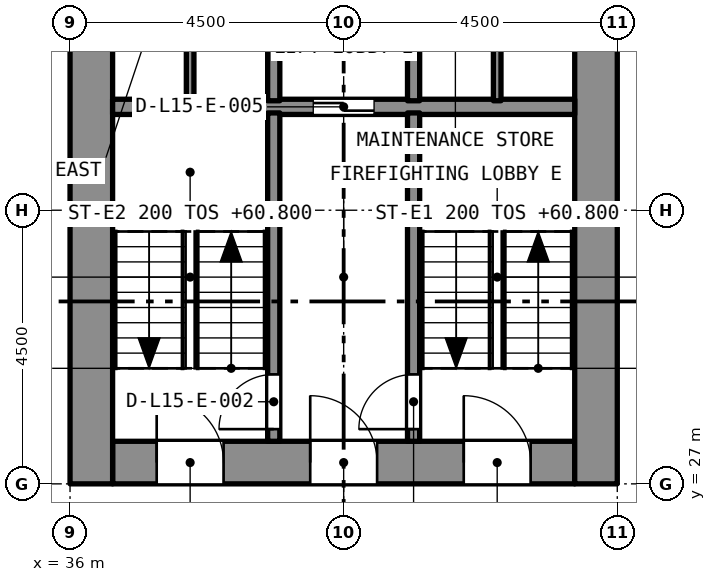
"""IFC4 building model, lengths in metres.
Left out: names, types, materials, properties, quantities, classifications, styles, units other than length and angle.
Written with IfcOpenShell. Run it as: python <this file> out.ifc"""

import sys

from ifc_helpers import new_model, si_unit, direction, frame, frame_2d, origin, place, context, subcontext, project, spatial, rectangle, extrude, element, fill, save


model = new_model("IFC4")
c1 = context("Model", 3, precision=1e-05, world=origin(), true_north=direction((0.0, 1.0)))
c2 = subcontext(c1, "Body", "Model", "MODEL_VIEW")
j1 = project(units=[si_unit("LENGTHUNIT", "METRE"), si_unit("PLANEANGLEUNIT", "RADIAN")], contexts=[c1])
p1 = place(None, origin())
s1 = spatial("IfcSite", under=j1, at=p1, CompositionType="ELEMENT")
p2 = place(p1, origin())
s2 = spatial("IfcBuilding", under=s1, at=p2, CompositionType="ELEMENT")
p3 = place(p2, frame((0.0, 0.0, 59.2)))
s3 = spatial("IfcBuildingStorey", under=s2, at=p3, CompositionType="ELEMENT", Elevation=59.2)
p4 = place(p3, frame((36.7, 27.35, 0.0), z_axis=(0.0, 0.0, 1.0), x_axis=(1.0, 0.0, 0.0)))
e1 = element("IfcWall", 1, at=p4, inside=s3, PredefinedType="SOLIDWALL", context=c2, shape_type="SweptSolid", body=[
    extrude(rectangle(XDim=7.6, YDim=0.7, at=frame_2d((3.8, 0.0))), origin(), (0.0, 0.0, 1.0), 3.2),
])
p5 = place(p4, frame((5.775, 0.0, 0.0)))
e2 = element("IfcOpeningElement", 2, at=p5, cuts=e1, PredefinedType="OPENING", context=c2, shape_type="SweptSolid", body=[
    extrude(rectangle(XDim=1.1, YDim=2.1, at=frame_2d((0.55, 1.05))), frame((0.0, 0.36, 0.0), z_axis=(0.0, -1.0, 0.0), x_axis=(1.0, 0.0, 0.0)), (0.0, 0.0, 1.0), 0.72),
])
p6 = place(p4, frame((3.25, 0.0, 0.0)))
e3 = element("IfcOpeningElement", 3, at=p6, cuts=e1, PredefinedType="OPENING", context=c2, shape_type="SweptSolid", body=[
    extrude(rectangle(XDim=1.1, YDim=2.1, at=frame_2d((0.55, 1.05))), frame((0.0, 0.36, 0.0), z_axis=(0.0, -1.0, 0.0), x_axis=(1.0, 0.0, 0.0)), (0.0, 0.0, 1.0), 0.72),
])
p7 = place(p4, frame((0.725, 0.0, 0.0)))
e4 = element("IfcOpeningElement", 4, at=p7, cuts=e1, PredefinedType="OPENING", context=c2, shape_type="SweptSolid", body=[
    extrude(rectangle(XDim=1.1, YDim=2.1, at=frame_2d((0.55, 1.05))), frame((0.0, 0.36, 0.0), z_axis=(0.0, -1.0, 0.0), x_axis=(1.0, 0.0, 0.0)), (0.0, 0.0, 1.0), 0.72),
])
p8 = place(p3, frame((36.35, 27.0, 0.0), z_axis=(0.0, 0.0, 1.0), x_axis=(0.0, 1.0, 0.0)))
e5 = element("IfcWall", 5, at=p8, inside=s3, PredefinedType="SOLIDWALL", context=c2, shape_type="SweptSolid", body=[
    extrude(rectangle(XDim=13.5, YDim=0.7, at=frame_2d((6.75, 0.0))), origin(), (0.0, 0.0, 1.0), 3.2),
])
p9 = place(p8, frame((8.95, 0.0, 0.0)))
e6 = element("IfcOpeningElement", 6, at=p9, cuts=e5, PredefinedType="OPENING", context=c2, shape_type="SweptSolid", body=[
    extrude(rectangle(XDim=1.2, YDim=2.1, at=frame_2d((0.6, 1.05))), frame((0.0, 0.36, 0.0), z_axis=(0.0, -1.0, 0.0), x_axis=(1.0, 0.0, 0.0)), (0.0, 0.0, 1.0), 0.72),
])
p10 = place(p3, frame((44.65, 27.0, 0.0), z_axis=(0.0, 0.0, 1.0), x_axis=(0.0, 1.0, 0.0)))
e7 = element("IfcWall", 7, at=p10, inside=s3, PredefinedType="SOLIDWALL", context=c2, shape_type="SweptSolid", body=[
    extrude(rectangle(XDim=13.5, YDim=0.7, at=frame_2d((6.75, 0.0))), origin(), (0.0, 0.0, 1.0), 3.2),
])
p11 = place(p10, frame((8.95, 0.0, 0.0)))
e8 = element("IfcOpeningElement", 8, at=p11, cuts=e7, PredefinedType="OPENING", context=c2, shape_type="SweptSolid", body=[
    extrude(rectangle(XDim=1.2, YDim=2.1, at=frame_2d((0.6, 1.05))), frame((0.0, 0.36, 0.0), z_axis=(0.0, -1.0, 0.0), x_axis=(1.0, 0.0, 0.0)), (0.0, 0.0, 1.0), 0.72),
])
p12 = place(p3, frame((36.7, 33.2, 0.0), z_axis=(0.0, 0.0, 1.0), x_axis=(1.0, 0.0, 0.0)))
e9 = element("IfcWall", 9, at=p12, inside=s3, PredefinedType="SOLIDWALL", context=c2, shape_type="SweptSolid", body=[
    extrude(rectangle(XDim=7.6, YDim=0.25, at=frame_2d((3.8, 0.0))), origin(), (0.0, 0.0, 1.0), 2.9),
])
p13 = place(p12, frame((3.3, 0.0, 0.0)))
e10 = element("IfcOpeningElement", 10, at=p13, cuts=e9, PredefinedType="OPENING", context=c2, shape_type="SweptSolid", body=[
    extrude(rectangle(XDim=1.0, YDim=2.1, at=frame_2d((0.5, 1.05))), frame((0.0, 0.135, 0.0), z_axis=(0.0, -1.0, 0.0), x_axis=(1.0, 0.0, 0.0)), (0.0, 0.0, 1.0), 0.27),
])
p14 = place(p3, frame((41.65, 27.7, 0.0), z_axis=(0.0, 0.0, 1.0), x_axis=(0.0, 1.0, 0.0)))
e11 = element("IfcWall", 11, at=p14, inside=s3, PredefinedType="SOLIDWALL", context=c2, shape_type="SweptSolid", body=[
    extrude(rectangle(XDim=5.4, YDim=0.2, at=frame_2d((2.7, 0.0))), origin(), (0.0, 0.0, 1.0), 2.9),
])
p15 = place(p14, frame((0.2, 0.0, 0.0)))
e12 = element("IfcOpeningElement", 12, at=p15, cuts=e11, PredefinedType="OPENING", context=c2, shape_type="SweptSolid", body=[
    extrude(rectangle(XDim=0.9, YDim=2.1, at=frame_2d((0.45, 1.05))), frame((0.0, 0.11, 0.0), z_axis=(0.0, -1.0, 0.0), x_axis=(1.0, 0.0, 0.0)), (0.0, 0.0, 1.0), 0.22),
])
p16 = place(p3, frame((39.35, 27.7, 0.0), z_axis=(0.0, 0.0, 1.0), x_axis=(0.0, 1.0, 0.0)))
e13 = element("IfcWall", 13, at=p16, inside=s3, PredefinedType="SOLIDWALL", context=c2, shape_type="SweptSolid", body=[
    extrude(rectangle(XDim=5.4, YDim=0.2, at=frame_2d((2.7, 0.0))), origin(), (0.0, 0.0, 1.0), 2.9),
])
p17 = place(p16, frame((0.2, 0.0, 0.0)))
e14 = element("IfcOpeningElement", 14, at=p17, cuts=e13, PredefinedType="OPENING", context=c2, shape_type="SweptSolid", body=[
    extrude(rectangle(XDim=0.9, YDim=2.1, at=frame_2d((0.45, 1.05))), frame((0.0, 0.11, 0.0), z_axis=(0.0, -1.0, 0.0), x_axis=(1.0, 0.0, 0.0)), (0.0, 0.0, 1.0), 0.22),
])
for number, where, z_axis, x_axis in (
    (15, (41.65, 33.3, 0.0), (0.0, 0.0, 1.0), (0.0, 1.0, 0.0)),
    (16, (39.35, 33.3, 0.0), (0.0, 0.0, 1.0), (0.0, 1.0, 0.0)),
):
    element("IfcWall", number, at=place(p3, frame(where, z_axis=z_axis, x_axis=x_axis)), inside=s3, PredefinedType="SOLIDWALL", context=c2, shape_type="SweptSolid", body=[
        extrude(rectangle(XDim=2.3, YDim=0.2, at=frame_2d((1.15, 0.0))), origin(), (0.0, 0.0, 1.0), 2.9),
    ])
for number, where, z_axis, x_axis in (
    (17, (43.025, 33.3, 0.0), (0.0, 0.0, 1.0), (0.0, 1.0, 0.0)),
    (18, (37.975, 33.3, 0.0), (0.0, 0.0, 1.0), (0.0, 1.0, 0.0)),
):
    element("IfcWall", number, at=place(p3, frame(where, z_axis=z_axis, x_axis=x_axis)), inside=s3, PredefinedType="PARTITIONING", context=c2, shape_type="SweptSolid", body=[
        extrude(rectangle(XDim=2.3, YDim=0.125, at=frame_2d((1.15, 0.0))), origin(), (0.0, 0.0, 1.0), 2.9),
    ])
p18 = place(p15, origin())
e19 = element("IfcDoor", 19, at=p18, inside=s3, OperationType="SINGLE_SWING_LEFT", PredefinedType="DOOR", context=c2, shape_type="SweptSolid", body=[
    extrude(rectangle(XDim=0.9, YDim=2.1, at=frame_2d((0.45, 1.05))), frame((0.0, 0.025, 0.0), z_axis=(0.0, -1.0, 0.0), x_axis=(1.0, 0.0, 0.0)), (0.0, 0.0, 1.0), 0.05),
])
fill(e12, e19)
p19 = place(p17, origin())
e20 = element("IfcDoor", 20, at=p19, inside=s3, OperationType="SINGLE_SWING_LEFT", PredefinedType="DOOR", context=c2, shape_type="SweptSolid", body=[
    extrude(rectangle(XDim=0.9, YDim=2.1, at=frame_2d((0.45, 1.05))), frame((0.0, 0.025, 0.0), z_axis=(0.0, -1.0, 0.0), x_axis=(1.0, 0.0, 0.0)), (0.0, 0.0, 1.0), 0.05),
])
fill(e14, e20)
p20 = place(p13, origin())
e21 = element("IfcDoor", 21, at=p20, inside=s3, OperationType="SLIDING_TO_LEFT", PredefinedType="DOOR", context=c2, shape_type="SweptSolid", body=[
    extrude(rectangle(XDim=1.0, YDim=2.1, at=frame_2d((0.5, 1.05))), frame((0.0, 0.025, 0.0), z_axis=(0.0, -1.0, 0.0), x_axis=(1.0, 0.0, 0.0)), (0.0, 0.0, 1.0), 0.05),
])
fill(e10, e21)
p21 = place(p5, origin())
e22 = element("IfcDoor", 22, at=p21, inside=s3, OperationType="SINGLE_SWING_LEFT", PredefinedType="DOOR", context=c2, shape_type="SweptSolid", body=[
    extrude(rectangle(XDim=1.1, YDim=2.1, at=frame_2d((0.55, 1.05))), frame((0.0, 0.025, 0.0), z_axis=(0.0, -1.0, 0.0), x_axis=(1.0, 0.0, 0.0)), (0.0, 0.0, 1.0), 0.05),
])
fill(e2, e22)
p22 = place(p6, origin())
e23 = element("IfcDoor", 23, at=p22, inside=s3, OperationType="SINGLE_SWING_LEFT", PredefinedType="DOOR", context=c2, shape_type="SweptSolid", body=[
    extrude(rectangle(XDim=1.1, YDim=2.1, at=frame_2d((0.55, 1.05))), frame((0.0, 0.025, 0.0), z_axis=(0.0, -1.0, 0.0), x_axis=(1.0, 0.0, 0.0)), (0.0, 0.0, 1.0), 0.05),
])
fill(e3, e23)
p23 = place(p7, origin())
e24 = element("IfcDoor", 24, at=p23, inside=s3, OperationType="SINGLE_SWING_LEFT", PredefinedType="DOOR", context=c2, shape_type="SweptSolid", body=[
    extrude(rectangle(XDim=1.1, YDim=2.1, at=frame_2d((0.55, 1.05))), frame((0.0, 0.025, 0.0), z_axis=(0.0, -1.0, 0.0), x_axis=(1.0, 0.0, 0.0)), (0.0, 0.0, 1.0), 0.05),
])
fill(e4, e24)
save(model, sys.argv[1])
